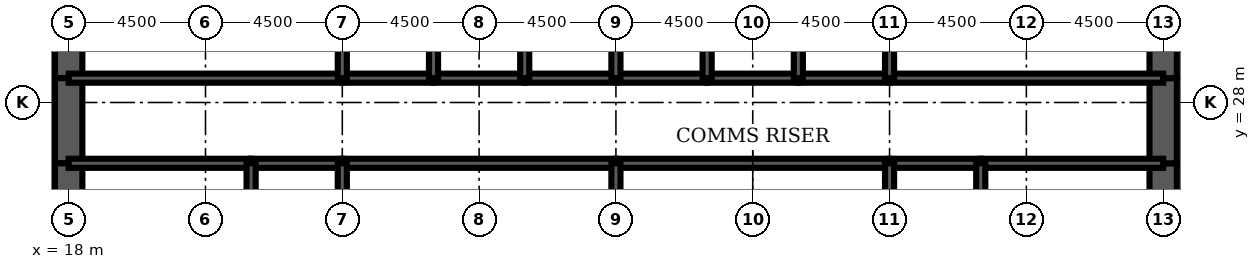
"""IFC4 building model, lengths in metres.
Left out: names, types, materials, properties, quantities, classifications, styles, units other than length and angle.
Written with IfcOpenShell. Run it as: python <this file> out.ifc"""

import sys

from ifc_helpers import new_model, si_unit, direction, frame, frame_2d, origin, place, context, subcontext, project, spatial, rectangle, extrude, element, fill, save


model = new_model("IFC4")
c1 = context("Model", 3, precision=1e-05, world=origin(), true_north=direction((0.0, 1.0)))
c2 = subcontext(c1, "Body", "Model", "MODEL_VIEW")
j1 = project(units=[si_unit("LENGTHUNIT", "METRE"), si_unit("PLANEANGLEUNIT", "RADIAN")], contexts=[c1])
p1 = place(None, origin())
s1 = spatial("IfcSite", under=j1, at=p1, CompositionType="ELEMENT")
p2 = place(p1, origin())
s2 = spatial("IfcBuilding", under=s1, at=p2, CompositionType="ELEMENT")
p3 = place(p2, frame((0.0, 0.0, 171.9)))
s3 = spatial("IfcBuildingStorey", under=s2, at=p3, CompositionType="ELEMENT", Elevation=171.9)
p4 = place(p3, frame((18.0, 32.0, 0.0), z_axis=(0.0, 0.0, 1.0), x_axis=(0.0, -1.0, 0.0)))
e1 = element("IfcWall", 1, at=p4, inside=s3, PredefinedType="SHEAR", context=c2, shape_type="SweptSolid", body=[
    extrude(rectangle(XDim=3.2, YDim=0.9, at=frame_2d((1.6, 0.0))), origin(), (0.0, 0.0, 1.0), 4.2),
])
p5 = place(p3, frame((18.0, 28.8, 0.0), z_axis=(0.0, 0.0, 1.0), x_axis=(0.0, -1.0, 0.0)))
e2 = element("IfcWall", 2, at=p5, inside=s3, PredefinedType="SHEAR", context=c2, shape_type="SweptSolid", body=[
    extrude(rectangle(XDim=2.8, YDim=0.9, at=frame_2d((1.4, 0.0))), origin(), (0.0, 0.0, 1.0), 4.2),
])
p6 = place(p5, frame((0.4, 0.0, 0.0)))
e3 = element("IfcOpeningElement", 3, at=p6, cuts=e2, PredefinedType="OPENING", context=c2, shape_type="SweptSolid", body=[
    extrude(rectangle(XDim=1.8, YDim=2.1, at=frame_2d((0.9, 1.05))), frame((0.0, 0.46, 0.0), z_axis=(0.0, -1.0, 0.0), x_axis=(1.0, 0.0, 0.0)), (0.0, 0.0, 1.0), 0.92),
])
for number, where, z_axis, x_axis in (
    (4, (18.0, 26.0, 0.0), (0.0, 0.0, 1.0), (0.0, -1.0, 0.0)),
    (5, (54.0, 22.0, 0.0), (0.0, 0.0, 1.0), (0.0, 1.0, 0.0)),
):
    element("IfcWall", number, at=place(p3, frame(where, z_axis=z_axis, x_axis=x_axis)), inside=s3, PredefinedType="SHEAR", context=c2, shape_type="SweptSolid", body=[
        extrude(rectangle(XDim=4.0, YDim=0.9, at=frame_2d((2.0, 0.0))), origin(), (0.0, 0.0, 1.0), 4.2),
    ])
p7 = place(p3, frame((54.0, 26.0, 0.0), z_axis=(0.0, 0.0, 1.0), x_axis=(0.0, 1.0, 0.0)))
e6 = element("IfcWall", 6, at=p7, inside=s3, PredefinedType="SHEAR", context=c2, shape_type="SweptSolid", body=[
    extrude(rectangle(XDim=2.8, YDim=0.9, at=frame_2d((1.4, 0.0))), origin(), (0.0, 0.0, 1.0), 4.2),
])
p8 = place(p7, frame((0.6, 0.0, 0.0)))
e7 = element("IfcOpeningElement", 7, at=p8, cuts=e6, PredefinedType="OPENING", context=c2, shape_type="SweptSolid", body=[
    extrude(rectangle(XDim=1.8, YDim=2.1, at=frame_2d((0.9, 1.05))), frame((0.0, 0.46, 0.0), z_axis=(0.0, -1.0, 0.0), x_axis=(1.0, 0.0, 0.0)), (0.0, 0.0, 1.0), 0.92),
])
p9 = place(p3, frame((54.0, 28.8, 0.0), z_axis=(0.0, 0.0, 1.0), x_axis=(0.0, 1.0, 0.0)))
e8 = element("IfcWall", 8, at=p9, inside=s3, PredefinedType="SHEAR", context=c2, shape_type="SweptSolid", body=[
    extrude(rectangle(XDim=3.2, YDim=0.9, at=frame_2d((1.6, 0.0))), origin(), (0.0, 0.0, 1.0), 4.2),
])
p10 = place(p3, frame((18.0, 28.8, 0.0), z_axis=(0.0, 0.0, 1.0), x_axis=(1.0, 0.0, 0.0)))
e9 = element("IfcWall", 9, at=p10, inside=s3, PredefinedType="SOLIDWALL", context=c2, shape_type="SweptSolid", body=[
    extrude(rectangle(XDim=9.0, YDim=0.3, at=frame_2d((4.5, 0.0))), origin(), (0.0, 0.0, 1.0), 4.2),
])
p11 = place(p10, frame((0.65, 0.0, 0.0)))
e10 = element("IfcOpeningElement", 10, at=p11, cuts=e9, PredefinedType="OPENING", context=c2, shape_type="SweptSolid", body=[
    extrude(rectangle(XDim=1.0, YDim=2.1, at=frame_2d((0.5, 1.05))), frame((0.0, 0.16, 0.0), z_axis=(0.0, -1.0, 0.0), x_axis=(1.0, 0.0, 0.0)), (0.0, 0.0, 1.0), 0.32),
])
p12 = place(p3, frame((27.0, 28.8, 0.0), z_axis=(0.0, 0.0, 1.0), x_axis=(1.0, 0.0, 0.0)))
e11 = element("IfcWall", 11, at=p12, inside=s3, PredefinedType="SOLIDWALL", context=c2, shape_type="SweptSolid", body=[
    extrude(rectangle(XDim=3.0, YDim=0.3, at=frame_2d((1.5, 0.0))), origin(), (0.0, 0.0, 1.0), 4.2),
])
p13 = place(p12, frame((0.95, 0.0, 0.0)))
e12 = element("IfcOpeningElement", 12, at=p13, cuts=e11, PredefinedType="OPENING", context=c2, shape_type="SweptSolid", body=[
    extrude(rectangle(XDim=1.1, YDim=2.2, at=frame_2d((0.55, 1.1))), frame((0.0, 0.16, 0.0), z_axis=(0.0, -1.0, 0.0), x_axis=(1.0, 0.0, 0.0)), (0.0, 0.0, 1.0), 0.32),
])
p14 = place(p3, frame((30.0, 28.8, 0.0), z_axis=(0.0, 0.0, 1.0), x_axis=(1.0, 0.0, 0.0)))
e13 = element("IfcWall", 13, at=p14, inside=s3, PredefinedType="SOLIDWALL", context=c2, shape_type="SweptSolid", body=[
    extrude(rectangle(XDim=3.0, YDim=0.3, at=frame_2d((1.5, 0.0))), origin(), (0.0, 0.0, 1.0), 4.2),
])
p15 = place(p14, frame((0.95, 0.0, 0.0)))
e14 = element("IfcOpeningElement", 14, at=p15, cuts=e13, PredefinedType="OPENING", context=c2, shape_type="SweptSolid", body=[
    extrude(rectangle(XDim=1.1, YDim=2.2, at=frame_2d((0.55, 1.1))), frame((0.0, 0.16, 0.0), z_axis=(0.0, -1.0, 0.0), x_axis=(1.0, 0.0, 0.0)), (0.0, 0.0, 1.0), 0.32),
])
p16 = place(p3, frame((33.0, 28.8, 0.0), z_axis=(0.0, 0.0, 1.0), x_axis=(1.0, 0.0, 0.0)))
e15 = element("IfcWall", 15, at=p16, inside=s3, PredefinedType="SOLIDWALL", context=c2, shape_type="SweptSolid", body=[
    extrude(rectangle(XDim=3.0, YDim=0.3, at=frame_2d((1.5, 0.0))), origin(), (0.0, 0.0, 1.0), 4.2),
])
p17 = place(p16, frame((0.95, 0.0, 0.0)))
e16 = element("IfcOpeningElement", 16, at=p17, cuts=e15, PredefinedType="OPENING", context=c2, shape_type="SweptSolid", body=[
    extrude(rectangle(XDim=1.1, YDim=2.2, at=frame_2d((0.55, 1.1))), frame((0.0, 0.16, 0.0), z_axis=(0.0, -1.0, 0.0), x_axis=(1.0, 0.0, 0.0)), (0.0, 0.0, 1.0), 0.32),
])
for number, where, z_axis, x_axis in (
    (17, (36.0, 28.8, 0.0), (0.0, 0.0, 1.0), (1.0, 0.0, 0.0)),
    (18, (39.0, 28.8, 0.0), (0.0, 0.0, 1.0), (1.0, 0.0, 0.0)),
):
    element("IfcWall", number, at=place(p3, frame(where, z_axis=z_axis, x_axis=x_axis)), inside=s3, PredefinedType="SOLIDWALL", context=c2, shape_type="SweptSolid", body=[
        extrude(rectangle(XDim=3.0, YDim=0.3, at=frame_2d((1.5, 0.0))), origin(), (0.0, 0.0, 1.0), 4.2),
    ])
p18 = place(p3, frame((42.0, 28.8, 0.0), z_axis=(0.0, 0.0, 1.0), x_axis=(1.0, 0.0, 0.0)))
e19 = element("IfcWall", 19, at=p18, inside=s3, PredefinedType="SOLIDWALL", context=c2, shape_type="SweptSolid", body=[
    extrude(rectangle(XDim=3.0, YDim=0.3, at=frame_2d((1.5, 0.0))), origin(), (0.0, 0.0, 1.0), 4.2),
])
p19 = place(p18, frame((0.95, 0.0, 0.0)))
e20 = element("IfcOpeningElement", 20, at=p19, cuts=e19, PredefinedType="OPENING", context=c2, shape_type="SweptSolid", body=[
    extrude(rectangle(XDim=1.1, YDim=2.2, at=frame_2d((0.55, 1.1))), frame((0.0, 0.16, 0.0), z_axis=(0.0, -1.0, 0.0), x_axis=(1.0, 0.0, 0.0)), (0.0, 0.0, 1.0), 0.32),
])
p20 = place(p3, frame((45.0, 28.8, 0.0), z_axis=(0.0, 0.0, 1.0), x_axis=(1.0, 0.0, 0.0)))
e21 = element("IfcWall", 21, at=p20, inside=s3, PredefinedType="SOLIDWALL", context=c2, shape_type="SweptSolid", body=[
    extrude(rectangle(XDim=9.0, YDim=0.3, at=frame_2d((4.5, 0.0))), origin(), (0.0, 0.0, 1.0), 4.2),
])
p21 = place(p20, frame((7.35, 0.0, 0.0)))
e22 = element("IfcOpeningElement", 22, at=p21, cuts=e21, PredefinedType="OPENING", context=c2, shape_type="SweptSolid", body=[
    extrude(rectangle(XDim=1.0, YDim=2.1, at=frame_2d((0.5, 1.05))), frame((0.0, 0.16, 0.0), z_axis=(0.0, -1.0, 0.0), x_axis=(1.0, 0.0, 0.0)), (0.0, 0.0, 1.0), 0.32),
])
p22 = place(p3, frame((18.0, 26.0, 0.0), z_axis=(0.0, 0.0, 1.0), x_axis=(1.0, 0.0, 0.0)))
e23 = element("IfcWall", 23, at=p22, inside=s3, PredefinedType="SOLIDWALL", context=c2, shape_type="SweptSolid", body=[
    extrude(rectangle(XDim=6.0, YDim=0.3, at=frame_2d((3.0, 0.0))), origin(), (0.0, 0.0, 1.0), 4.2),
])
p23 = place(p3, frame((24.0, 26.0, 0.0), z_axis=(0.0, 0.0, 1.0), x_axis=(1.0, 0.0, 0.0)))
e24 = element("IfcWall", 24, at=p23, inside=s3, PredefinedType="SOLIDWALL", context=c2, shape_type="SweptSolid", body=[
    extrude(rectangle(XDim=3.0, YDim=0.3, at=frame_2d((1.5, 0.0))), origin(), (0.0, 0.0, 1.0), 4.2),
])
for number, where, z_axis, x_axis in (
    (25, (27.0, 26.0, 0.0), (0.0, 0.0, 1.0), (1.0, 0.0, 0.0)),
    (26, (36.0, 26.0, 0.0), (0.0, 0.0, 1.0), (1.0, 0.0, 0.0)),
):
    element("IfcWall", number, at=place(p3, frame(where, z_axis=z_axis, x_axis=x_axis)), inside=s3, PredefinedType="SOLIDWALL", context=c2, shape_type="SweptSolid", body=[
        extrude(rectangle(XDim=9.0, YDim=0.3, at=frame_2d((4.5, 0.0))), origin(), (0.0, 0.0, 1.0), 4.2),
    ])
p24 = place(p3, frame((45.0, 26.0, 0.0), z_axis=(0.0, 0.0, 1.0), x_axis=(1.0, 0.0, 0.0)))
e27 = element("IfcWall", 27, at=p24, inside=s3, PredefinedType="SOLIDWALL", context=c2, shape_type="SweptSolid", body=[
    extrude(rectangle(XDim=3.0, YDim=0.3, at=frame_2d((1.5, 0.0))), origin(), (0.0, 0.0, 1.0), 4.2),
])
p25 = place(p3, frame((48.0, 26.0, 0.0), z_axis=(0.0, 0.0, 1.0), x_axis=(1.0, 0.0, 0.0)))
e28 = element("IfcWall", 28, at=p25, inside=s3, PredefinedType="SOLIDWALL", context=c2, shape_type="SweptSolid", body=[
    extrude(rectangle(XDim=6.0, YDim=0.3, at=frame_2d((3.0, 0.0))), origin(), (0.0, 0.0, 1.0), 4.2),
])
for number, where, z_axis, x_axis in (
    (29, (27.0, 28.8, 0.0), (0.0, 0.0, 1.0), (0.0, 1.0, 0.0)),
    (30, (30.0, 28.8, 0.0), (0.0, 0.0, 1.0), (0.0, 1.0, 0.0)),
    (31, (33.0, 28.8, 0.0), (0.0, 0.0, 1.0), (0.0, 1.0, 0.0)),
    (32, (36.0, 28.8, 0.0), (0.0, 0.0, 1.0), (0.0, 1.0, 0.0)),
    (33, (39.0, 28.8, 0.0), (0.0, 0.0, 1.0), (0.0, 1.0, 0.0)),
    (34, (42.0, 28.8, 0.0), (0.0, 0.0, 1.0), (0.0, 1.0, 0.0)),
    (35, (45.0, 28.8, 0.0), (0.0, 0.0, 1.0), (0.0, 1.0, 0.0)),
):
    element("IfcWall", number, at=place(p3, frame(where, z_axis=z_axis, x_axis=x_axis)), inside=s3, PredefinedType="SOLIDWALL", context=c2, shape_type="SweptSolid", body=[
        extrude(rectangle(XDim=3.2, YDim=0.3, at=frame_2d((1.6, 0.0))), origin(), (0.0, 0.0, 1.0), 4.2),
    ])
for number, where, z_axis, x_axis in (
    (36, (24.0, 22.0, 0.0), (0.0, 0.0, 1.0), (0.0, 1.0, 0.0)),
    (37, (27.0, 22.0, 0.0), (0.0, 0.0, 1.0), (0.0, 1.0, 0.0)),
    (38, (36.0, 22.0, 0.0), (0.0, 0.0, 1.0), (0.0, 1.0, 0.0)),
    (39, (45.0, 22.0, 0.0), (0.0, 0.0, 1.0), (0.0, 1.0, 0.0)),
    (40, (48.0, 22.0, 0.0), (0.0, 0.0, 1.0), (0.0, 1.0, 0.0)),
):
    element("IfcWall", number, at=place(p3, frame(where, z_axis=z_axis, x_axis=x_axis)), inside=s3, PredefinedType="SOLIDWALL", context=c2, shape_type="SweptSolid", body=[
        extrude(rectangle(XDim=4.0, YDim=0.3, at=frame_2d((2.0, 0.0))), origin(), (0.0, 0.0, 1.0), 4.2),
    ])
p26 = place(p3, frame((42.0, 22.15, 0.0), z_axis=(0.0, 0.0, 1.0), x_axis=(0.0, 1.0, 0.0)))
e41 = element("IfcWall", 41, at=p26, inside=s3, PredefinedType="PARTITIONING", context=c2, shape_type="SweptSolid", body=[
    extrude(rectangle(XDim=3.7, YDim=0.15, at=frame_2d((1.85, 0.0))), origin(), (0.0, 0.0, 1.0), 3.0),
])
p27 = place(p26, frame((2.2, 0.0, 0.0)))
e42 = element("IfcOpeningElement", 42, at=p27, cuts=e41, PredefinedType="OPENING", context=c2, shape_type="SweptSolid", body=[
    extrude(rectangle(XDim=1.0, YDim=2.1, at=frame_2d((0.5, 1.05))), frame((0.0, 0.085, 0.0), z_axis=(0.0, -1.0, 0.0), x_axis=(1.0, 0.0, 0.0)), (0.0, 0.0, 1.0), 0.17),
])
for number, where, z_axis, x_axis in (
    (43, (20.025, 22.15, 0.0), (0.0, 0.0, 1.0), (0.0, 1.0, 0.0)),
    (44, (51.675, 22.15, 0.0), (0.0, 0.0, 1.0), (0.0, 1.0, 0.0)),
):
    element("IfcWall", number, at=place(p3, frame(where, z_axis=z_axis, x_axis=x_axis)), inside=s3, PredefinedType="PARTITIONING", context=c2, shape_type="SweptSolid", body=[
        extrude(rectangle(XDim=3.7, YDim=0.15, at=frame_2d((1.85, 0.0))), origin(), (0.0, 0.0, 1.0), 3.0),
    ])
p28 = place(p27, origin())
e45 = element("IfcDoor", 45, at=p28, inside=s3, OperationType="SINGLE_SWING_RIGHT", PredefinedType="DOOR", context=c2, shape_type="SweptSolid", body=[
    extrude(rectangle(XDim=1.0, YDim=2.1, at=frame_2d((0.5, 1.05))), frame((0.0, 0.025, 0.0), z_axis=(0.0, -1.0, 0.0), x_axis=(1.0, 0.0, 0.0)), (0.0, 0.0, 1.0), 0.05),
])
fill(e42, e45)
p29 = place(p19, origin())
e46 = element("IfcDoor", 46, at=p29, inside=s3, OperationType="DOUBLE_DOOR_SLIDING", PredefinedType="USERDEFINED", context=c2, shape_type="SweptSolid", body=[
    extrude(rectangle(XDim=1.1, YDim=2.2, at=frame_2d((0.55, 1.1))), frame((0.0, 0.025, 0.0), z_axis=(0.0, -1.0, 0.0), x_axis=(1.0, 0.0, 0.0)), (0.0, 0.0, 1.0), 0.05),
])
fill(e20, e46)
p30 = place(p13, origin())
e47 = element("IfcDoor", 47, at=p30, inside=s3, OperationType="DOUBLE_DOOR_SLIDING", PredefinedType="USERDEFINED", context=c2, shape_type="SweptSolid", body=[
    extrude(rectangle(XDim=1.1, YDim=2.2, at=frame_2d((0.55, 1.1))), frame((0.0, 0.025, 0.0), z_axis=(0.0, -1.0, 0.0), x_axis=(1.0, 0.0, 0.0)), (0.0, 0.0, 1.0), 0.05),
])
fill(e12, e47)
p31 = place(p15, origin())
e48 = element("IfcDoor", 48, at=p31, inside=s3, OperationType="DOUBLE_DOOR_SLIDING", PredefinedType="USERDEFINED", context=c2, shape_type="SweptSolid", body=[
    extrude(rectangle(XDim=1.1, YDim=2.2, at=frame_2d((0.55, 1.1))), frame((0.0, 0.025, 0.0), z_axis=(0.0, -1.0, 0.0), x_axis=(1.0, 0.0, 0.0)), (0.0, 0.0, 1.0), 0.05),
])
fill(e14, e48)
p32 = place(p17, origin())
e49 = element("IfcDoor", 49, at=p32, inside=s3, OperationType="DOUBLE_DOOR_SLIDING", PredefinedType="USERDEFINED", context=c2, shape_type="SweptSolid", body=[
    extrude(rectangle(XDim=1.1, YDim=2.2, at=frame_2d((0.55, 1.1))), frame((0.0, 0.025, 0.0), z_axis=(0.0, -1.0, 0.0), x_axis=(1.0, 0.0, 0.0)), (0.0, 0.0, 1.0), 0.05),
])
fill(e16, e49)
p33 = place(p11, origin())
e50 = element("IfcDoor", 50, at=p33, inside=s3, OperationType="SINGLE_SWING_LEFT", PredefinedType="DOOR", context=c2, shape_type="SweptSolid", body=[
    extrude(rectangle(XDim=1.0, YDim=2.1, at=frame_2d((0.5, 1.05))), frame((0.0, 0.025, 0.0), z_axis=(0.0, -1.0, 0.0), x_axis=(1.0, 0.0, 0.0)), (0.0, 0.0, 1.0), 0.05),
])
fill(e10, e50)
p34 = place(p21, origin())
e51 = element("IfcDoor", 51, at=p34, inside=s3, OperationType="SINGLE_SWING_RIGHT", PredefinedType="DOOR", context=c2, shape_type="SweptSolid", body=[
    extrude(rectangle(XDim=1.0, YDim=2.1, at=frame_2d((0.5, 1.05))), frame((0.0, 0.025, 0.0), z_axis=(0.0, -1.0, 0.0), x_axis=(1.0, 0.0, 0.0)), (0.0, 0.0, 1.0), 0.05),
])
fill(e22, e51)
p35 = place(p6, origin())
e52 = element("IfcDoor", 52, at=p35, inside=s3, OperationType="SINGLE_SWING_LEFT", PredefinedType="DOOR", context=c2, shape_type="SweptSolid", body=[
    extrude(rectangle(XDim=1.8, YDim=2.1, at=frame_2d((0.9, 1.05))), frame((0.0, 0.45, 0.0), z_axis=(0.0, -1.0, 0.0), x_axis=(1.0, 0.0, 0.0)), (0.0, 0.0, 1.0), 0.899),
])
fill(e3, e52)
p36 = place(p8, origin())
e53 = element("IfcDoor", 53, at=p36, inside=s3, OperationType="SINGLE_SWING_LEFT", PredefinedType="DOOR", context=c2, shape_type="SweptSolid", body=[
    extrude(rectangle(XDim=1.8, YDim=2.1, at=frame_2d((0.9, 1.05))), frame((0.0, 0.45, 0.0), z_axis=(0.0, -1.0, 0.0), x_axis=(1.0, 0.0, 0.0)), (0.0, 0.0, 1.0), 0.899),
])
fill(e7, e53)
save(model, sys.argv[1])
